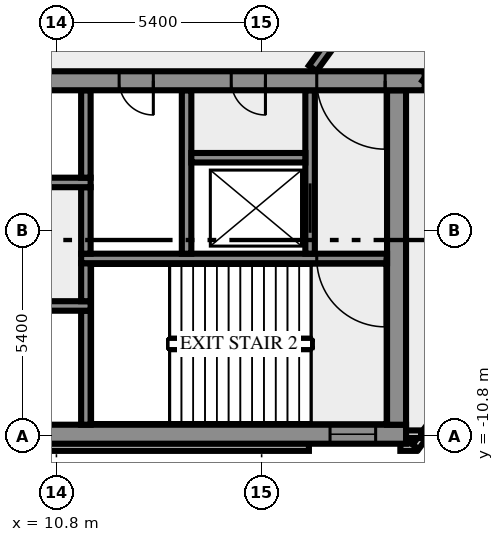
"""IFC4 building model, lengths in metres.
Left out: names, types, materials, properties, quantities, classifications, styles, units other than length and angle.
Written with IfcOpenShell. Run it as: python <this file> out.ifc"""

import sys

from ifc_helpers import new_model, si_unit, direction, frame, frame_2d, origin, place, context, subcontext, project, spatial, rectangle, extrude, element, fill, save


model = new_model("IFC4")
c1 = context("Model", 3, precision=1e-05, world=origin(), true_north=direction((0.0, 1.0)))
c2 = subcontext(c1, "Body", "Model", "MODEL_VIEW")
j1 = project(units=[si_unit("LENGTHUNIT", "METRE"), si_unit("PLANEANGLEUNIT", "RADIAN")], contexts=[c1])
p1 = place(None, origin())
s1 = spatial("IfcSite", under=j1, at=p1, CompositionType="ELEMENT")
p2 = place(p1, origin())
s2 = spatial("IfcBuilding", under=s1, at=p2, CompositionType="ELEMENT")
p3 = place(p2, frame((0.0, 0.0, 6.0)))
s3 = spatial("IfcBuildingStorey", under=s2, at=p3, CompositionType="ELEMENT", Elevation=6.0)
p4 = place(p3, frame((-17.444, -11.088, 0.0), z_axis=(0.0, 0.0, 1.0), x_axis=(1.0, 0.0, 0.0)))
e1 = element("IfcWall", 1, at=p4, inside=s3, PredefinedType="SOLIDWALL", context=c2, shape_type="SweptSolid", body=[
    extrude(rectangle(XDim=34.888, YDim=0.2, at=frame_2d((17.444, 0.0))), origin(), (0.0, 0.0, 1.0), 5.1),
])
p5 = place(p3, frame((19.85, -11.088, 0.0), z_axis=(0.0, 0.0, 1.0), x_axis=(1.0, 0.0, 0.0)))
e2 = element("IfcWall", 2, at=p5, inside=s3, PredefinedType="SOLIDWALL", context=c2, shape_type="SweptSolid", body=[
    extrude(rectangle(XDim=0.406, YDim=0.2, at=frame_2d((0.203, 0.0))), origin(), (0.0, 0.0, 1.0), 5.1),
])
p6 = place(p3, frame((20.253, -11.083, 0.0), z_axis=(0.0, 0.0, 1.0), x_axis=(0.587766567315, 0.809030569476, 0.0)))
e3 = element("IfcWall", 3, at=p6, inside=s3, PredefinedType="SOLIDWALL", context=c2, shape_type="SweptSolid", body=[
    extrude(rectangle(XDim=2.688, YDim=0.2, at=frame_2d((1.344, 0.0))), origin(), (0.0, 0.0, 1.0), 5.1),
])
p7 = place(p3, frame((19.98, -10.75, 0.0), z_axis=(0.0, 0.0, 1.0), x_axis=(1.0, 0.0, 0.0)))
e4 = element("IfcWall", 4, at=p7, inside=s3, PredefinedType="SOLIDWALL", context=c2, shape_type="SweptSolid", body=[
    extrude(rectangle(XDim=0.417, YDim=0.2, at=frame_2d((0.208, 0.0))), origin(), (0.0, 0.0, 1.0), 5.1),
])
p8 = place(p3, frame((-20.0, -10.75, 0.0), z_axis=(0.0, 0.0, 1.0), x_axis=(1.0, 0.0, 0.0)))
e5 = element("IfcWall", 5, at=p8, inside=s3, PredefinedType="SHEAR", context=c2, shape_type="SweptSolid", body=[
    extrude(rectangle(XDim=40.0, YDim=0.5, at=frame_2d((20.0, 0.0))), origin(), (0.0, 0.0, 1.0), 5.1),
])
p9 = place(p8, frame((0.8, 0.0, 1.0)))
e6 = element("IfcOpeningElement", 6, at=p9, cuts=e5, PredefinedType="OPENING", context=c2, shape_type="SweptSolid", body=[
    extrude(rectangle(XDim=1.2, YDim=1.2, at=frame_2d((0.6, 0.6))), frame((0.0, 0.26, 0.0), z_axis=(0.0, -1.0, 0.0), x_axis=(1.0, 0.0, 0.0)), (0.0, 0.0, 1.0), 0.52),
])
p10 = place(p8, frame((38.0, 0.0, 1.0)))
e7 = element("IfcOpeningElement", 7, at=p10, cuts=e5, PredefinedType="OPENING", context=c2, shape_type="SweptSolid", body=[
    extrude(rectangle(XDim=1.2, YDim=1.2, at=frame_2d((0.6, 0.6))), frame((0.0, 0.26, 0.0), z_axis=(0.0, -1.0, 0.0), x_axis=(1.0, 0.0, 0.0)), (0.0, 0.0, 1.0), 0.52),
])
p11 = place(p3, frame((11.575, -10.5, 0.0), z_axis=(0.0, 0.0, 1.0), x_axis=(0.0, 1.0, 0.0)))
e8 = element("IfcWall", 8, at=p11, inside=s3, PredefinedType="SHEAR", context=c2, shape_type="SweptSolid", body=[
    extrude(rectangle(XDim=3.0, YDim=0.25, at=frame_2d((1.5, 0.0))), origin(), (0.0, 0.0, 1.0), 5.1),
])
p12 = place(p3, frame((19.75, -10.5, 0.0), z_axis=(0.0, 0.0, 1.0), x_axis=(0.0, 1.0, 0.0)))
e9 = element("IfcWall", 9, at=p12, inside=s3, PredefinedType="SHEAR", context=c2, shape_type="SweptSolid", body=[
    extrude(rectangle(XDim=8.8, YDim=0.5, at=frame_2d((4.4, 0.0))), origin(), (0.0, 0.0, 1.0), 5.1),
])
p13 = place(p3, frame((11.7, -7.375, 0.0), z_axis=(0.0, 0.0, 1.0), x_axis=(-1.0, 0.0, 0.0)))
e10 = element("IfcWall", 10, at=p13, inside=s3, PredefinedType="SHEAR", context=c2, shape_type="SweptSolid", body=[
    extrude(rectangle(XDim=23.4, YDim=0.25, at=frame_2d((11.7, 0.0))), origin(), (0.0, 0.0, 1.0), 5.1),
])
p14 = place(p13, frame((21.45, 0.0, 0.0)))
e11 = element("IfcOpeningElement", 11, at=p14, cuts=e10, PredefinedType="OPENING", context=c2, shape_type="SweptSolid", body=[
    extrude(rectangle(XDim=1.1, YDim=2.1, at=frame_2d((0.55, 1.05))), frame((0.0, 0.135, 0.0), z_axis=(0.0, -1.0, 0.0), x_axis=(1.0, 0.0, 0.0)), (0.0, 0.0, 1.0), 0.27),
])
p15 = place(p13, frame((18.95, 0.0, 0.0)))
e12 = element("IfcOpeningElement", 12, at=p15, cuts=e10, PredefinedType="OPENING", context=c2, shape_type="SweptSolid", body=[
    extrude(rectangle(XDim=1.1, YDim=2.1, at=frame_2d((0.55, 1.05))), frame((0.0, 0.135, 0.0), z_axis=(0.0, -1.0, 0.0), x_axis=(1.0, 0.0, 0.0)), (0.0, 0.0, 1.0), 0.27),
])
p16 = place(p13, frame((16.45, 0.0, 0.0)))
e13 = element("IfcOpeningElement", 13, at=p16, cuts=e10, PredefinedType="OPENING", context=c2, shape_type="SweptSolid", body=[
    extrude(rectangle(XDim=1.1, YDim=2.1, at=frame_2d((0.55, 1.05))), frame((0.0, 0.135, 0.0), z_axis=(0.0, -1.0, 0.0), x_axis=(1.0, 0.0, 0.0)), (0.0, 0.0, 1.0), 0.27),
])
p17 = place(p13, frame((14.65, 0.0, 0.0)))
e14 = element("IfcOpeningElement", 14, at=p17, cuts=e10, PredefinedType="OPENING", context=c2, shape_type="SweptSolid", body=[
    extrude(rectangle(XDim=0.8, YDim=2.1, at=frame_2d((0.4, 1.05))), frame((0.0, 0.135, 0.0), z_axis=(0.0, -1.0, 0.0), x_axis=(1.0, 0.0, 0.0)), (0.0, 0.0, 1.0), 0.27),
])
p18 = place(p13, frame((12.8, 0.0, 0.0)))
e15 = element("IfcOpeningElement", 15, at=p18, cuts=e10, PredefinedType="OPENING", context=c2, shape_type="SweptSolid", body=[
    extrude(rectangle(XDim=0.9, YDim=2.1, at=frame_2d((0.45, 1.05))), frame((0.0, 0.135, 0.0), z_axis=(0.0, -1.0, 0.0), x_axis=(1.0, 0.0, 0.0)), (0.0, 0.0, 1.0), 0.27),
])
p19 = place(p13, frame((10.7, 0.0, 0.0)))
e16 = element("IfcOpeningElement", 16, at=p19, cuts=e10, PredefinedType="OPENING", context=c2, shape_type="SweptSolid", body=[
    extrude(rectangle(XDim=0.9, YDim=2.1, at=frame_2d((0.45, 1.05))), frame((0.0, 0.135, 0.0), z_axis=(0.0, -1.0, 0.0), x_axis=(1.0, 0.0, 0.0)), (0.0, 0.0, 1.0), 0.27),
])
p20 = place(p3, frame((11.575, -7.25, 0.0), z_axis=(0.0, 0.0, 1.0), x_axis=(0.0, 1.0, 0.0)))
e17 = element("IfcWall", 17, at=p20, inside=s3, PredefinedType="SHEAR", context=c2, shape_type="SweptSolid", body=[
    extrude(rectangle(XDim=1.0, YDim=0.25, at=frame_2d((0.5, 0.0))), origin(), (0.0, 0.0, 1.0), 5.1),
])
p21 = place(p3, frame((19.5, -6.125, 0.0), z_axis=(0.0, 0.0, 1.0), x_axis=(-1.0, 0.0, 0.0)))
e18 = element("IfcWall", 18, at=p21, inside=s3, PredefinedType="SHEAR", context=c2, shape_type="SweptSolid", body=[
    extrude(rectangle(XDim=8.05, YDim=0.25, at=frame_2d((4.025, 0.0))), origin(), (0.0, 0.0, 1.0), 5.1),
])
p22 = place(p21, frame((0.05, 0.0, 0.0)))
e19 = element("IfcOpeningElement", 19, at=p22, cuts=e18, PredefinedType="OPENING", context=c2, shape_type="SweptSolid", body=[
    extrude(rectangle(XDim=1.8, YDim=2.1, at=frame_2d((0.9, 1.05))), frame((0.0, 0.135, 0.0), z_axis=(0.0, -1.0, 0.0), x_axis=(1.0, 0.0, 0.0)), (0.0, 0.0, 1.0), 0.27),
])
p23 = place(p3, frame((11.575, -6.0, 0.0), z_axis=(0.0, 0.0, 1.0), x_axis=(0.0, 1.0, 0.0)))
e20 = element("IfcWall", 20, at=p23, inside=s3, PredefinedType="SHEAR", context=c2, shape_type="SweptSolid", body=[
    extrude(rectangle(XDim=1.75, YDim=0.25, at=frame_2d((0.875, 0.0))), origin(), (0.0, 0.0, 1.0), 5.1),
])
p24 = place(p3, frame((14.225, -6.0, 0.0), z_axis=(0.0, 0.0, 1.0), x_axis=(0.0, 1.0, 0.0)))
e21 = element("IfcWall", 21, at=p24, inside=s3, PredefinedType="SHEAR", context=c2, shape_type="SweptSolid", body=[
    extrude(rectangle(XDim=4.3, YDim=0.25, at=frame_2d((2.15, 0.0))), origin(), (0.0, 0.0, 1.0), 5.1),
])
p25 = place(p3, frame((17.475, -6.0, 0.0), z_axis=(0.0, 0.0, 1.0), x_axis=(0.0, 1.0, 0.0)))
e22 = element("IfcWall", 22, at=p25, inside=s3, PredefinedType="SHEAR", context=c2, shape_type="SweptSolid", body=[
    extrude(rectangle(XDim=4.3, YDim=0.25, at=frame_2d((2.15, 0.0))), origin(), (0.0, 0.0, 1.0), 5.1),
])
p26 = place(p25, frame((0.55, 0.0, 0.0)))
e23 = element("IfcOpeningElement", 23, at=p26, cuts=e22, PredefinedType="OPENING", context=c2, shape_type="SweptSolid", body=[
    extrude(rectangle(XDim=1.3, YDim=2.1, at=frame_2d((0.65, 1.05))), frame((0.0, 0.135, 0.0), z_axis=(0.0, -1.0, 0.0), x_axis=(1.0, 0.0, 0.0)), (0.0, 0.0, 1.0), 0.27),
])
p27 = place(p3, frame((1.45, -4.125, 0.0), z_axis=(0.0, 0.0, 1.0), x_axis=(1.0, 0.0, 0.0)))
e24 = element("IfcWall", 24, at=p27, inside=s3, PredefinedType="SHEAR", context=c2, shape_type="SweptSolid", body=[
    extrude(rectangle(XDim=10.25, YDim=0.25, at=frame_2d((5.125, 0.0))), origin(), (0.0, 0.0, 1.0), 5.1),
])
p28 = place(p27, frame((0.7, 0.0, 0.0)))
e25 = element("IfcOpeningElement", 25, at=p28, cuts=e24, PredefinedType="OPENING", context=c2, shape_type="SweptSolid", body=[
    extrude(rectangle(XDim=1.3, YDim=2.1, at=frame_2d((0.65, 1.05))), frame((0.0, 0.135, 0.0), z_axis=(0.0, -1.0, 0.0), x_axis=(1.0, 0.0, 0.0)), (0.0, 0.0, 1.0), 0.27),
])
p29 = place(p3, frame((11.575, -4.0, 0.0), z_axis=(0.0, 0.0, 1.0), x_axis=(0.0, 1.0, 0.0)))
e26 = element("IfcWall", 26, at=p29, inside=s3, PredefinedType="SHEAR", context=c2, shape_type="SweptSolid", body=[
    extrude(rectangle(XDim=2.3, YDim=0.25, at=frame_2d((1.15, 0.0))), origin(), (0.0, 0.0, 1.0), 5.1),
])
p30 = place(p3, frame((14.35, -3.475, 0.0), z_axis=(0.0, 0.0, 1.0), x_axis=(1.0, 0.0, 0.0)))
e27 = element("IfcWall", 27, at=p30, inside=s3, PredefinedType="SHEAR", context=c2, shape_type="SweptSolid", body=[
    extrude(rectangle(XDim=3.0, YDim=0.25, at=frame_2d((1.5, 0.0))), origin(), (0.0, 0.0, 1.0), 5.1),
])
p31 = place(p3, frame((20.49, -1.45, 0.0), z_axis=(0.0, 0.0, 1.0), x_axis=(-1.0, 0.0, 0.0)))
e28 = element("IfcWall", 28, at=p31, inside=s3, PredefinedType="SHEAR", context=c2, shape_type="SweptSolid", body=[
    extrude(rectangle(XDim=40.98, YDim=0.5, at=frame_2d((20.49, 0.0))), origin(), (0.0, 0.0, 1.0), 5.1),
])
p32 = place(p31, frame((38.14, 0.0, 0.0)))
e29 = element("IfcOpeningElement", 29, at=p32, cuts=e28, PredefinedType="OPENING", context=c2, shape_type="SweptSolid", body=[
    extrude(rectangle(XDim=1.8, YDim=2.1, at=frame_2d((0.9, 1.05))), frame((0.0, 0.26, 0.0), z_axis=(0.0, -1.0, 0.0), x_axis=(1.0, 0.0, 0.0)), (0.0, 0.0, 1.0), 0.52),
])
p33 = place(p31, frame((36.728, 0.0, 0.0)))
e30 = element("IfcOpeningElement", 30, at=p33, cuts=e28, PredefinedType="OPENING", context=c2, shape_type="SweptSolid", body=[
    extrude(rectangle(XDim=0.8, YDim=2.1, at=frame_2d((0.4, 1.05))), frame((0.0, 0.26, 0.0), z_axis=(0.0, -1.0, 0.0), x_axis=(1.0, 0.0, 0.0)), (0.0, 0.0, 1.0), 0.52),
])
p34 = place(p31, frame((35.153, 0.0, 0.0)))
e31 = element("IfcOpeningElement", 31, at=p34, cuts=e28, PredefinedType="OPENING", context=c2, shape_type="SweptSolid", body=[
    extrude(rectangle(XDim=0.8, YDim=2.1, at=frame_2d((0.4, 1.05))), frame((0.0, 0.26, 0.0), z_axis=(0.0, -1.0, 0.0), x_axis=(1.0, 0.0, 0.0)), (0.0, 0.0, 1.0), 0.52),
])
p35 = place(p31, frame((32.94, 0.0, 0.0)))
e32 = element("IfcOpeningElement", 32, at=p35, cuts=e28, PredefinedType="OPENING", context=c2, shape_type="SweptSolid", body=[
    extrude(rectangle(XDim=0.9, YDim=2.1, at=frame_2d((0.45, 1.05))), frame((0.0, 0.26, 0.0), z_axis=(0.0, -1.0, 0.0), x_axis=(1.0, 0.0, 0.0)), (0.0, 0.0, 1.0), 0.52),
])
p36 = place(p31, frame((19.59, 0.0, 0.0)))
e33 = element("IfcOpeningElement", 33, at=p36, cuts=e28, PredefinedType="OPENING", context=c2, shape_type="SweptSolid", body=[
    extrude(rectangle(XDim=2.0, YDim=2.1, at=frame_2d((1.0, 1.05))), frame((0.0, 0.26, 0.0), z_axis=(0.0, -1.0, 0.0), x_axis=(1.0, 0.0, 0.0)), (0.0, 0.0, 1.0), 0.52),
])
p37 = place(p31, frame((7.14, 0.0, 0.0)))
e34 = element("IfcOpeningElement", 34, at=p37, cuts=e28, PredefinedType="OPENING", context=c2, shape_type="SweptSolid", body=[
    extrude(rectangle(XDim=0.9, YDim=2.1, at=frame_2d((0.45, 1.05))), frame((0.0, 0.26, 0.0), z_axis=(0.0, -1.0, 0.0), x_axis=(1.0, 0.0, 0.0)), (0.0, 0.0, 1.0), 0.52),
])
p38 = place(p31, frame((4.19, 0.0, 0.0)))
e35 = element("IfcOpeningElement", 35, at=p38, cuts=e28, PredefinedType="OPENING", context=c2, shape_type="SweptSolid", body=[
    extrude(rectangle(XDim=0.9, YDim=2.1, at=frame_2d((0.45, 1.05))), frame((0.0, 0.26, 0.0), z_axis=(0.0, -1.0, 0.0), x_axis=(1.0, 0.0, 0.0)), (0.0, 0.0, 1.0), 0.52),
])
p39 = place(p31, frame((1.04, 0.0, 0.0)))
e36 = element("IfcOpeningElement", 36, at=p39, cuts=e28, PredefinedType="OPENING", context=c2, shape_type="SweptSolid", body=[
    extrude(rectangle(XDim=1.8, YDim=2.1, at=frame_2d((0.9, 1.05))), frame((0.0, 0.26, 0.0), z_axis=(0.0, -1.0, 0.0), x_axis=(1.0, 0.0, 0.0)), (0.0, 0.0, 1.0), 0.52),
])
p40 = place(p3, frame((49.869, 38.856, 0.0), z_axis=(0.0, 0.0, 1.0), x_axis=(-0.587784522481, -0.809017524614, 0.0)))
e37 = element("IfcWall", 37, at=p40, inside=s3, PredefinedType="SOLIDWALL", context=c2, shape_type="SweptSolid", body=[
    extrude(rectangle(XDim=49.912, YDim=0.25, at=frame_2d((24.956, 0.0))), origin(), (0.0, 0.0, 1.0), 5.1),
])
p41 = place(p40, frame((17.146, 0.0, 0.0)))
e38 = element("IfcOpeningElement", 38, at=p41, cuts=e37, PredefinedType="OPENING", context=c2, shape_type="SweptSolid", body=[
    extrude(rectangle(XDim=0.9, YDim=2.1, at=frame_2d((0.45, 1.05))), frame((0.0, 0.135, 0.0), z_axis=(0.0, -1.0, 0.0), x_axis=(1.0, 0.0, 0.0)), (0.0, 0.0, 1.0), 0.27),
])
p42 = place(p40, frame((47.629, 0.0, 0.0)))
e39 = element("IfcOpeningElement", 39, at=p42, cuts=e37, PredefinedType="OPENING", context=c2, shape_type="SweptSolid", body=[
    extrude(rectangle(XDim=1.8, YDim=2.1, at=frame_2d((0.9, 1.05))), frame((0.0, 0.135, 0.0), z_axis=(0.0, -1.0, 0.0), x_axis=(1.0, 0.0, 0.0)), (0.0, 0.0, 1.0), 0.27),
])
p43 = place(p40, frame((26.547, 0.0, 0.0)))
e40 = element("IfcOpeningElement", 40, at=p43, cuts=e37, PredefinedType="OPENING", context=c2, shape_type="SweptSolid", body=[
    extrude(rectangle(XDim=1.8, YDim=2.1, at=frame_2d((0.9, 1.05))), frame((0.0, 0.135, 0.0), z_axis=(0.0, -1.0, 0.0), x_axis=(1.0, 0.0, 0.0)), (0.0, 0.0, 1.0), 0.27),
])
p44 = place(p40, frame((0.442, 0.0, 0.0)))
e41 = element("IfcOpeningElement", 41, at=p44, cuts=e37, PredefinedType="OPENING", context=c2, shape_type="SweptSolid", body=[
    extrude(rectangle(XDim=0.9, YDim=2.1, at=frame_2d((0.45, 1.05))), frame((0.0, 0.135, 0.0), z_axis=(0.0, -1.0, 0.0), x_axis=(1.0, 0.0, 0.0)), (0.0, 0.0, 1.0), 0.27),
])
p45 = place(p3, frame((17.545, -1.125, 0.0), z_axis=(0.0, 0.0, 1.0), x_axis=(0.587786323093, 0.809016216391, 0.0)))
e42 = element("IfcWall", 42, at=p45, inside=s3, PredefinedType="SOLIDWALL", context=c2, shape_type="SweptSolid", body=[
    extrude(rectangle(XDim=33.493, YDim=0.25, at=frame_2d((16.747, 0.0))), origin(), (0.0, 0.0, 1.0), 5.1),
])
p46 = place(p45, frame((17.508, 0.0, 0.0)))
e43 = element("IfcOpeningElement", 43, at=p46, cuts=e42, PredefinedType="OPENING", context=c2, shape_type="SweptSolid", body=[
    extrude(rectangle(XDim=0.9, YDim=2.1, at=frame_2d((0.45, 1.05))), frame((0.0, 0.135, 0.0), z_axis=(0.0, -1.0, 0.0), x_axis=(1.0, 0.0, 0.0)), (0.0, 0.0, 1.0), 0.27),
])
p47 = place(p45, frame((29.908, 0.0, 0.0)))
e44 = element("IfcOpeningElement", 44, at=p47, cuts=e42, PredefinedType="OPENING", context=c2, shape_type="SweptSolid", body=[
    extrude(rectangle(XDim=0.9, YDim=2.1, at=frame_2d((0.45, 1.05))), frame((0.0, 0.135, 0.0), z_axis=(0.0, -1.0, 0.0), x_axis=(1.0, 0.0, 0.0)), (0.0, 0.0, 1.0), 0.27),
])
p48 = place(p45, frame((23.258, 0.0, 0.0)))
e45 = element("IfcOpeningElement", 45, at=p48, cuts=e42, PredefinedType="OPENING", context=c2, shape_type="SweptSolid", body=[
    extrude(rectangle(XDim=1.8, YDim=2.1, at=frame_2d((0.9, 1.05))), frame((0.0, 0.135, 0.0), z_axis=(0.0, -1.0, 0.0), x_axis=(1.0, 0.0, 0.0)), (0.0, 0.0, 1.0), 0.27),
])
p49 = place(p10, origin())
e46 = element("IfcWindow", 46, at=p49, inside=s3, PartitioningType="SINGLE_PANEL", PredefinedType="WINDOW", context=c2, shape_type="SweptSolid", body=[
    extrude(rectangle(XDim=1.2, YDim=1.2, at=frame_2d((0.6, 0.6))), frame((0.0, 0.03, 0.0), z_axis=(0.0, -1.0, 0.0), x_axis=(1.0, 0.0, 0.0)), (0.0, 0.0, 1.0), 0.06),
])
fill(e7, e46)
p50 = place(p22, origin())
e47 = element("IfcDoor", 47, at=p50, inside=s3, OperationType="DOUBLE_DOOR_SINGLE_SWING", PredefinedType="DOOR", context=c2, shape_type="SweptSolid", body=[
    extrude(rectangle(XDim=1.8, YDim=2.1, at=frame_2d((0.9, 1.05))), frame((0.0, 0.025, 0.0), z_axis=(0.0, -1.0, 0.0), x_axis=(1.0, 0.0, 0.0)), (0.0, 0.0, 1.0), 0.05),
])
fill(e19, e47)
p51 = place(p26, origin())
e48 = element("IfcDoor", 48, at=p51, inside=s3, OperationType="DOUBLE_DOOR_SLIDING", PredefinedType="DOOR", context=c2, shape_type="SweptSolid", body=[
    extrude(rectangle(XDim=1.3, YDim=2.1, at=frame_2d((0.65, 1.05))), frame((0.0, 0.025, 0.0), z_axis=(0.0, -1.0, 0.0), x_axis=(1.0, 0.0, 0.0)), (0.0, 0.0, 1.0), 0.05),
])
fill(e23, e48)
p52 = place(p37, origin())
e49 = element("IfcDoor", 49, at=p52, inside=s3, OperationType="SINGLE_SWING_LEFT", PredefinedType="DOOR", context=c2, shape_type="SweptSolid", body=[
    extrude(rectangle(XDim=0.9, YDim=2.1, at=frame_2d((0.45, 1.05))), frame((0.0, 0.025, 0.0), z_axis=(0.0, -1.0, 0.0), x_axis=(1.0, 0.0, 0.0)), (0.0, 0.0, 1.0), 0.05),
])
fill(e34, e49)
p53 = place(p38, origin())
e50 = element("IfcDoor", 50, at=p53, inside=s3, OperationType="SINGLE_SWING_LEFT", PredefinedType="DOOR", context=c2, shape_type="SweptSolid", body=[
    extrude(rectangle(XDim=0.9, YDim=2.1, at=frame_2d((0.45, 1.05))), frame((0.0, 0.025, 0.0), z_axis=(0.0, -1.0, 0.0), x_axis=(1.0, 0.0, 0.0)), (0.0, 0.0, 1.0), 0.05),
])
fill(e35, e50)
p54 = place(p39, origin())
e51 = element("IfcDoor", 51, at=p54, inside=s3, OperationType="DOUBLE_DOOR_SINGLE_SWING", PredefinedType="DOOR", context=c2, shape_type="SweptSolid", body=[
    extrude(rectangle(XDim=1.8, YDim=2.1, at=frame_2d((0.9, 1.05))), frame((0.0, 0.025, 0.0), z_axis=(0.0, -1.0, 0.0), x_axis=(1.0, 0.0, 0.0)), (0.0, 0.0, 1.0), 0.05),
])
fill(e36, e51)
save(model, sys.argv[1])
